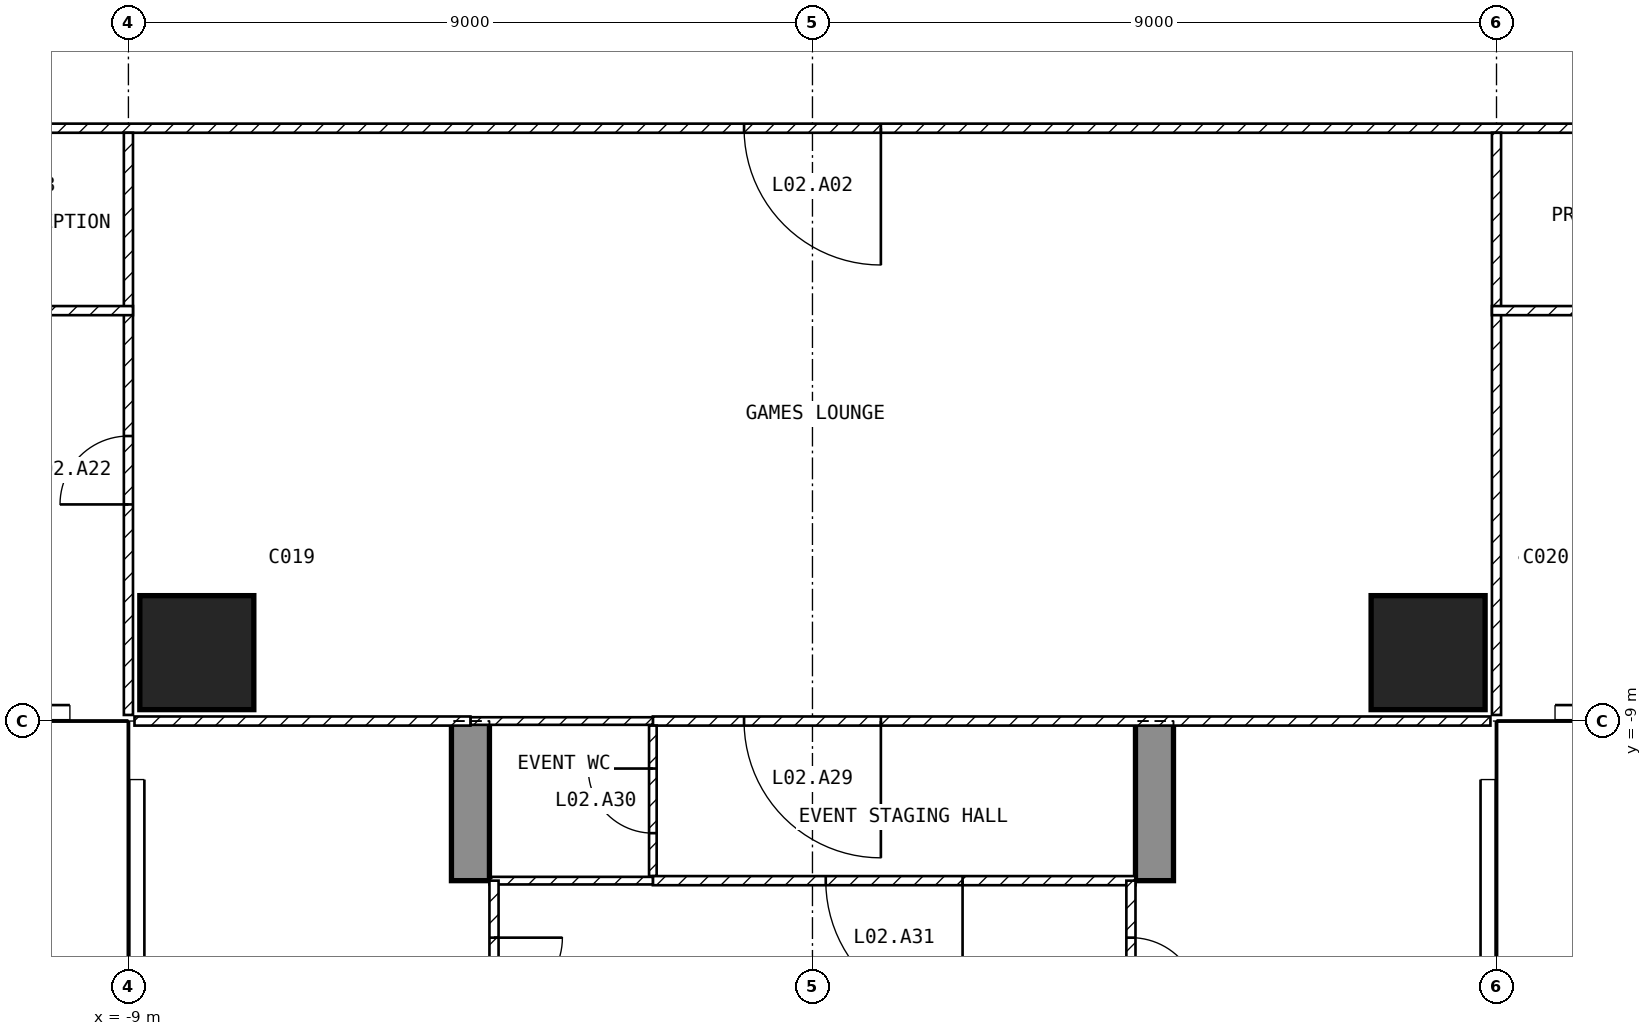
"""IFC4 building model, lengths in metres.
Left out: names, types, materials, properties, quantities, classifications, styles, units other than length and angle.
Written with IfcOpenShell. Run it as: python <this file> out.ifc"""

import sys

from ifc_helpers import new_model, si_unit, direction, frame, frame_2d, origin, origin_2d, place, context, subcontext, project, spatial, polyline, rectangle, outline, extrude, element, fill, save


model = new_model("IFC4")
c1 = context("Model", 3, precision=1e-05, world=origin(), true_north=direction((0.0, 1.0)))
c2 = subcontext(c1, "Body", "Model", "MODEL_VIEW")
j1 = project(units=[si_unit("LENGTHUNIT", "METRE"), si_unit("PLANEANGLEUNIT", "RADIAN")], contexts=[c1])
p1 = place(None, origin())
s1 = spatial("IfcSite", under=j1, at=p1, CompositionType="ELEMENT")
p2 = place(p1, origin())
s2 = spatial("IfcBuilding", under=s1, at=p2, CompositionType="ELEMENT")
p3 = place(p2, frame((0.0, 0.0, 21.0)))
s3 = spatial("IfcBuildingStorey", under=s2, at=p3, CompositionType="ELEMENT", Elevation=21.0)
for number, where, z_axis, x_axis in (
    (1, (-8.1, -8.1, -1.4), (0.0, 0.0, 1.0), (1.0, 0.0, 0.0)),
    (2, (8.1, -8.1, -1.4), (0.0, 0.0, 1.0), (1.0, 0.0, 0.0)),
):
    element("IfcColumn", number, at=place(p3, frame(where, z_axis=z_axis, x_axis=x_axis)), inside=s3, PredefinedType="COLUMN", context=c2, shape_type="SweptSolid", body=[
        extrude(rectangle(XDim=1.5, YDim=1.5, at=origin_2d()), origin(), (0.0, 0.0, 1.0), 6.95),
    ])
for number, where, z_axis, x_axis in (
    (3, (-4.75, -25.35, -0.3), (1.0, 0.0, 0.0), (0.0, 1.0, 0.0)),
    (4, (4.25, -25.35, -0.3), (1.0, 0.0, 0.0), (0.0, 1.0, 0.0)),
):
    element("IfcWall", number, at=place(p3, frame(where, z_axis=z_axis, x_axis=x_axis)), inside=s3, PredefinedType="SHEAR", context=c2, shape_type="SweptSolid", body=[
        extrude(outline(polyline([(0.0, 0.0), (4.05, 0.0), (4.05, 2.7), (6.45, 2.7), (6.45, 0.0), (11.85, 0.0), (11.85, 2.7), (14.25, 2.7), (14.25, 0.0), (16.35, 0.0), (16.35, 5.85), (0.0, 5.85), (0.0, 0.0)])), origin(), (0.0, 0.0, 1.0), 0.5),
    ])
p4 = place(p3, frame((18.6, -1.2, 0.0), z_axis=(0.0, 0.0, 1.0), x_axis=(-1.0, 0.0, 0.0)))
e5 = element("IfcWall", 5, at=p4, inside=s3, PredefinedType="PARTITIONING", context=c2, shape_type="SweptSolid", body=[
    extrude(rectangle(XDim=33.0, YDim=0.12, at=frame_2d((16.5, 0.0))), origin(), (0.0, 0.0, 1.0), 5.55),
])
p5 = place(p4, frame((17.7, 0.0, 0.0)))
e6 = element("IfcOpeningElement", 6, at=p5, cuts=e5, PredefinedType="OPENING", context=c2, shape_type="SweptSolid", body=[
    extrude(rectangle(XDim=1.8, YDim=2.1, at=frame_2d((0.9, 1.05))), frame((0.0, 0.07, 0.0), z_axis=(0.0, -1.0, 0.0), x_axis=(1.0, 0.0, 0.0)), (0.0, 0.0, 1.0), 0.14),
])
p6 = place(p4, frame((2.25, 0.0, 0.0)))
e7 = element("IfcOpeningElement", 7, at=p6, cuts=e5, PredefinedType="OPENING", context=c2, shape_type="SweptSolid", body=[
    extrude(rectangle(XDim=0.9, YDim=2.1, at=frame_2d((0.45, 1.05))), frame((0.0, 0.07, 0.0), z_axis=(0.0, -1.0, 0.0), x_axis=(1.0, 0.0, 0.0)), (0.0, 0.0, 1.0), 0.14),
])
p7 = place(p4, frame((28.65, 0.0, 0.0)))
e8 = element("IfcOpeningElement", 8, at=p7, cuts=e5, PredefinedType="OPENING", context=c2, shape_type="SweptSolid", body=[
    extrude(rectangle(XDim=0.9, YDim=2.1, at=frame_2d((0.45, 1.05))), frame((0.0, 0.07, 0.0), z_axis=(0.0, -1.0, 0.0), x_axis=(1.0, 0.0, 0.0)), (0.0, 0.0, 1.0), 0.14),
])
p8 = place(p3, frame((9.0, -1.26, 0.0), z_axis=(0.0, 0.0, 1.0), x_axis=(0.0, -1.0, 0.0)))
e9 = element("IfcWall", 9, at=p8, inside=s3, PredefinedType="PARTITIONING", context=c2, shape_type="SweptSolid", body=[
    extrude(rectangle(XDim=7.66, YDim=0.12, at=frame_2d((3.83, 0.0))), origin(), (0.0, 0.0, 1.0), 5.55),
])
p9 = place(p3, frame((-9.0, -8.92, 0.0), z_axis=(0.0, 0.0, 1.0), x_axis=(0.0, 1.0, 0.0)))
e10 = element("IfcWall", 10, at=p9, inside=s3, PredefinedType="PARTITIONING", context=c2, shape_type="SweptSolid", body=[
    extrude(rectangle(XDim=7.66, YDim=0.12, at=frame_2d((3.83, 0.0))), origin(), (0.0, 0.0, 1.0), 5.55),
])
p10 = place(p9, frame((2.77, 0.0, 0.0)))
e11 = element("IfcOpeningElement", 11, at=p10, cuts=e10, PredefinedType="OPENING", context=c2, shape_type="SweptSolid", body=[
    extrude(rectangle(XDim=0.9, YDim=2.1, at=frame_2d((0.45, 1.05))), frame((0.0, 0.07, 0.0), z_axis=(0.0, -1.0, 0.0), x_axis=(1.0, 0.0, 0.0)), (0.0, 0.0, 1.0), 0.14),
])
p11 = place(p3, frame((8.92, -9.0, 0.0), z_axis=(0.0, 0.0, 1.0), x_axis=(-1.0, 0.0, 0.0)))
e12 = element("IfcWall", 12, at=p11, inside=s3, PredefinedType="PARTITIONING", context=c2, shape_type="SweptSolid", body=[
    extrude(rectangle(XDim=11.02, YDim=0.12, at=frame_2d((5.51, 0.0))), origin(), (0.0, 0.0, 1.0), 5.55),
])
p12 = place(p11, frame((8.02, 0.0, 0.0)))
e13 = element("IfcOpeningElement", 13, at=p12, cuts=e12, PredefinedType="OPENING", context=c2, shape_type="SweptSolid", body=[
    extrude(rectangle(XDim=1.8, YDim=2.1, at=frame_2d((0.9, 1.05))), frame((0.0, 0.07, 0.0), z_axis=(0.0, -1.0, 0.0), x_axis=(1.0, 0.0, 0.0)), (0.0, 0.0, 1.0), 0.14),
])
p13 = place(p3, frame((-2.1, -9.0, 0.0), z_axis=(0.0, 0.0, 1.0), x_axis=(-1.0, 0.0, 0.0)))
e14 = element("IfcWall", 14, at=p13, inside=s3, PredefinedType="PARTITIONING", context=c2, shape_type="SweptSolid", body=[
    extrude(rectangle(XDim=2.4, YDim=0.1, at=frame_2d((1.2, 0.0))), origin(), (0.0, 0.0, 1.0), 5.55),
])
p14 = place(p3, frame((-4.5, -9.0, 0.0), z_axis=(0.0, 0.0, 1.0), x_axis=(-1.0, 0.0, 0.0)))
e15 = element("IfcWall", 15, at=p14, inside=s3, PredefinedType="PARTITIONING", context=c2, shape_type="SweptSolid", body=[
    extrude(rectangle(XDim=4.42, YDim=0.12, at=frame_2d((2.21, 0.0))), origin(), (0.0, 0.0, 1.0), 5.55),
])
p15 = place(p3, frame((8.94, -3.6, 0.0), z_axis=(0.0, 0.0, 1.0), x_axis=(1.0, 0.0, 0.0)))
e16 = element("IfcWall", 16, at=p15, inside=s3, PredefinedType="PARTITIONING", context=c2, shape_type="SweptSolid", body=[
    extrude(rectangle(XDim=9.66, YDim=0.12, at=frame_2d((4.83, 0.0))), origin(), (0.0, 0.0, 1.0), 5.55),
])
p16 = place(p15, frame((6.51, 0.0, 0.0)))
e17 = element("IfcOpeningElement", 17, at=p16, cuts=e16, PredefinedType="OPENING", context=c2, shape_type="SweptSolid", body=[
    extrude(rectangle(XDim=0.9, YDim=2.1, at=frame_2d((0.45, 1.05))), frame((0.0, 0.07, 0.0), z_axis=(0.0, -1.0, 0.0), x_axis=(1.0, 0.0, 0.0)), (0.0, 0.0, 1.0), 0.14),
])
p17 = place(p3, frame((-14.4, -3.6, 0.0), z_axis=(0.0, 0.0, 1.0), x_axis=(1.0, 0.0, 0.0)))
e18 = element("IfcWall", 18, at=p17, inside=s3, PredefinedType="PARTITIONING", context=c2, shape_type="SweptSolid", body=[
    extrude(rectangle(XDim=5.46, YDim=0.12, at=frame_2d((2.73, 0.0))), origin(), (0.0, 0.0, 1.0), 5.55),
])
p18 = place(p3, frame((-2.1, -11.04, 0.0), z_axis=(0.0, 0.0, 1.0), x_axis=(0.0, 1.0, 0.0)))
e19 = element("IfcWall", 19, at=p18, inside=s3, PredefinedType="PARTITIONING", context=c2, shape_type="SweptSolid", body=[
    extrude(rectangle(XDim=1.98, YDim=0.1, at=frame_2d((0.99, 0.0))), origin(), (0.0, 0.0, 1.0), 5.55),
])
p19 = place(p18, frame((0.565, 0.0, 0.0)))
e20 = element("IfcOpeningElement", 20, at=p19, cuts=e19, PredefinedType="OPENING", context=c2, shape_type="SweptSolid", body=[
    extrude(rectangle(XDim=0.85, YDim=2.1, at=frame_2d((0.425, 1.05))), frame((0.0, 0.06, 0.0), z_axis=(0.0, -1.0, 0.0), x_axis=(1.0, 0.0, 0.0)), (0.0, 0.0, 1.0), 0.12),
])
p20 = place(p3, frame((4.25, -11.1, 0.0), z_axis=(0.0, 0.0, 1.0), x_axis=(-1.0, 0.0, 0.0)))
e21 = element("IfcWall", 21, at=p20, inside=s3, PredefinedType="PARTITIONING", context=c2, shape_type="SweptSolid", body=[
    extrude(rectangle(XDim=6.35, YDim=0.12, at=frame_2d((3.175, 0.0))), origin(), (0.0, 0.0, 1.0), 5.55),
])
p21 = place(p20, frame((2.275, 0.0, 0.0)))
e22 = element("IfcOpeningElement", 22, at=p21, cuts=e21, PredefinedType="OPENING", context=c2, shape_type="SweptSolid", body=[
    extrude(rectangle(XDim=1.8, YDim=2.1, at=frame_2d((0.9, 1.05))), frame((0.0, 0.07, 0.0), z_axis=(0.0, -1.0, 0.0), x_axis=(1.0, 0.0, 0.0)), (0.0, 0.0, 1.0), 0.14),
])
p22 = place(p3, frame((-2.1, -11.1, 0.0), z_axis=(0.0, 0.0, 1.0), x_axis=(-1.0, 0.0, 0.0)))
e23 = element("IfcWall", 23, at=p22, inside=s3, PredefinedType="PARTITIONING", context=c2, shape_type="SweptSolid", body=[
    extrude(rectangle(XDim=2.15, YDim=0.1, at=frame_2d((1.075, 0.0))), origin(), (0.0, 0.0, 1.0), 5.55),
])
p23 = place(p3, frame((4.19, -11.1, 0.0), z_axis=(0.0, 0.0, 1.0), x_axis=(0.0, -1.0, 0.0)))
e24 = element("IfcWall", 24, at=p23, inside=s3, PredefinedType="PARTITIONING", context=c2, shape_type="SweptSolid", body=[
    extrude(rectangle(XDim=2.4, YDim=0.12, at=frame_2d((1.2, 0.0))), origin(), (0.0, 0.0, 1.0), 2.4),
])
p24 = place(p23, frame((0.75, 0.0, 0.0)))
e25 = element("IfcOpeningElement", 25, at=p24, cuts=e24, PredefinedType="OPENING", context=c2, shape_type="SweptSolid", body=[
    extrude(rectangle(XDim=0.9, YDim=2.1, at=frame_2d((0.45, 1.05))), frame((0.0, 0.07, 0.0), z_axis=(0.0, -1.0, 0.0), x_axis=(1.0, 0.0, 0.0)), (0.0, 0.0, 1.0), 0.14),
])
p25 = place(p3, frame((-4.19, -11.1, 0.0), z_axis=(0.0, 0.0, 1.0), x_axis=(0.0, -1.0, 0.0)))
e26 = element("IfcWall", 26, at=p25, inside=s3, PredefinedType="PARTITIONING", context=c2, shape_type="SweptSolid", body=[
    extrude(rectangle(XDim=2.4, YDim=0.12, at=frame_2d((1.2, 0.0))), origin(), (0.0, 0.0, 1.0), 2.4),
])
p26 = place(p25, frame((0.75, 0.0, 0.0)))
e27 = element("IfcOpeningElement", 27, at=p26, cuts=e26, PredefinedType="OPENING", context=c2, shape_type="SweptSolid", body=[
    extrude(rectangle(XDim=0.9, YDim=2.1, at=frame_2d((0.45, 1.05))), frame((0.0, 0.07, 0.0), z_axis=(0.0, -1.0, 0.0), x_axis=(1.0, 0.0, 0.0)), (0.0, 0.0, 1.0), 0.14),
])
p27 = place(p5, origin())
e28 = element("IfcDoor", 28, at=p27, inside=s3, OperationType="SINGLE_SWING_LEFT", PredefinedType="DOOR", context=c2, shape_type="SweptSolid", body=[
    extrude(rectangle(XDim=1.8, YDim=2.1, at=frame_2d((0.9, 1.05))), frame((0.0, 0.025, 0.0), z_axis=(0.0, -1.0, 0.0), x_axis=(1.0, 0.0, 0.0)), (0.0, 0.0, 1.0), 0.05),
])
fill(e6, e28)
p28 = place(p10, origin())
e29 = element("IfcDoor", 29, at=p28, inside=s3, OperationType="SINGLE_SWING_LEFT", PredefinedType="DOOR", context=c2, shape_type="SweptSolid", body=[
    extrude(rectangle(XDim=0.9, YDim=2.1, at=frame_2d((0.45, 1.05))), frame((0.0, 0.025, 0.0), z_axis=(0.0, -1.0, 0.0), x_axis=(1.0, 0.0, 0.0)), (0.0, 0.0, 1.0), 0.05),
])
fill(e11, e29)
p29 = place(p12, origin())
e30 = element("IfcDoor", 30, at=p29, inside=s3, OperationType="SINGLE_SWING_LEFT", PredefinedType="DOOR", context=c2, shape_type="SweptSolid", body=[
    extrude(rectangle(XDim=1.8, YDim=2.1, at=frame_2d((0.9, 1.05))), frame((0.0, 0.025, 0.0), z_axis=(0.0, -1.0, 0.0), x_axis=(1.0, 0.0, 0.0)), (0.0, 0.0, 1.0), 0.05),
])
fill(e13, e30)
p30 = place(p19, origin())
e31 = element("IfcDoor", 31, at=p30, inside=s3, OperationType="SINGLE_SWING_RIGHT", PredefinedType="DOOR", context=c2, shape_type="SweptSolid", body=[
    extrude(rectangle(XDim=0.85, YDim=2.1, at=frame_2d((0.425, 1.05))), frame((0.0, 0.025, 0.0), z_axis=(0.0, -1.0, 0.0), x_axis=(1.0, 0.0, 0.0)), (0.0, 0.0, 1.0), 0.05),
])
fill(e20, e31)
p31 = place(p21, origin())
e32 = element("IfcDoor", 32, at=p31, inside=s3, OperationType="SINGLE_SWING_LEFT", PredefinedType="DOOR", context=c2, shape_type="SweptSolid", body=[
    extrude(rectangle(XDim=1.8, YDim=2.1, at=frame_2d((0.9, 1.05))), frame((0.0, 0.025, 0.0), z_axis=(0.0, -1.0, 0.0), x_axis=(1.0, 0.0, 0.0)), (0.0, 0.0, 1.0), 0.05),
])
fill(e22, e32)
p32 = place(p24, origin())
e33 = element("IfcDoor", 33, at=p32, inside=s3, OperationType="SINGLE_SWING_RIGHT", PredefinedType="DOOR", context=c2, shape_type="SweptSolid", body=[
    extrude(rectangle(XDim=0.9, YDim=2.1, at=frame_2d((0.45, 1.05))), frame((0.0, 0.025, 0.0), z_axis=(0.0, -1.0, 0.0), x_axis=(1.0, 0.0, 0.0)), (0.0, 0.0, 1.0), 0.05),
])
fill(e25, e33)
p33 = place(p26, origin())
e34 = element("IfcDoor", 34, at=p33, inside=s3, OperationType="SINGLE_SWING_LEFT", PredefinedType="DOOR", context=c2, shape_type="SweptSolid", body=[
    extrude(rectangle(XDim=0.9, YDim=2.1, at=frame_2d((0.45, 1.05))), frame((0.0, 0.025, 0.0), z_axis=(0.0, -1.0, 0.0), x_axis=(1.0, 0.0, 0.0)), (0.0, 0.0, 1.0), 0.05),
])
fill(e27, e34)
save(model, sys.argv[1])
